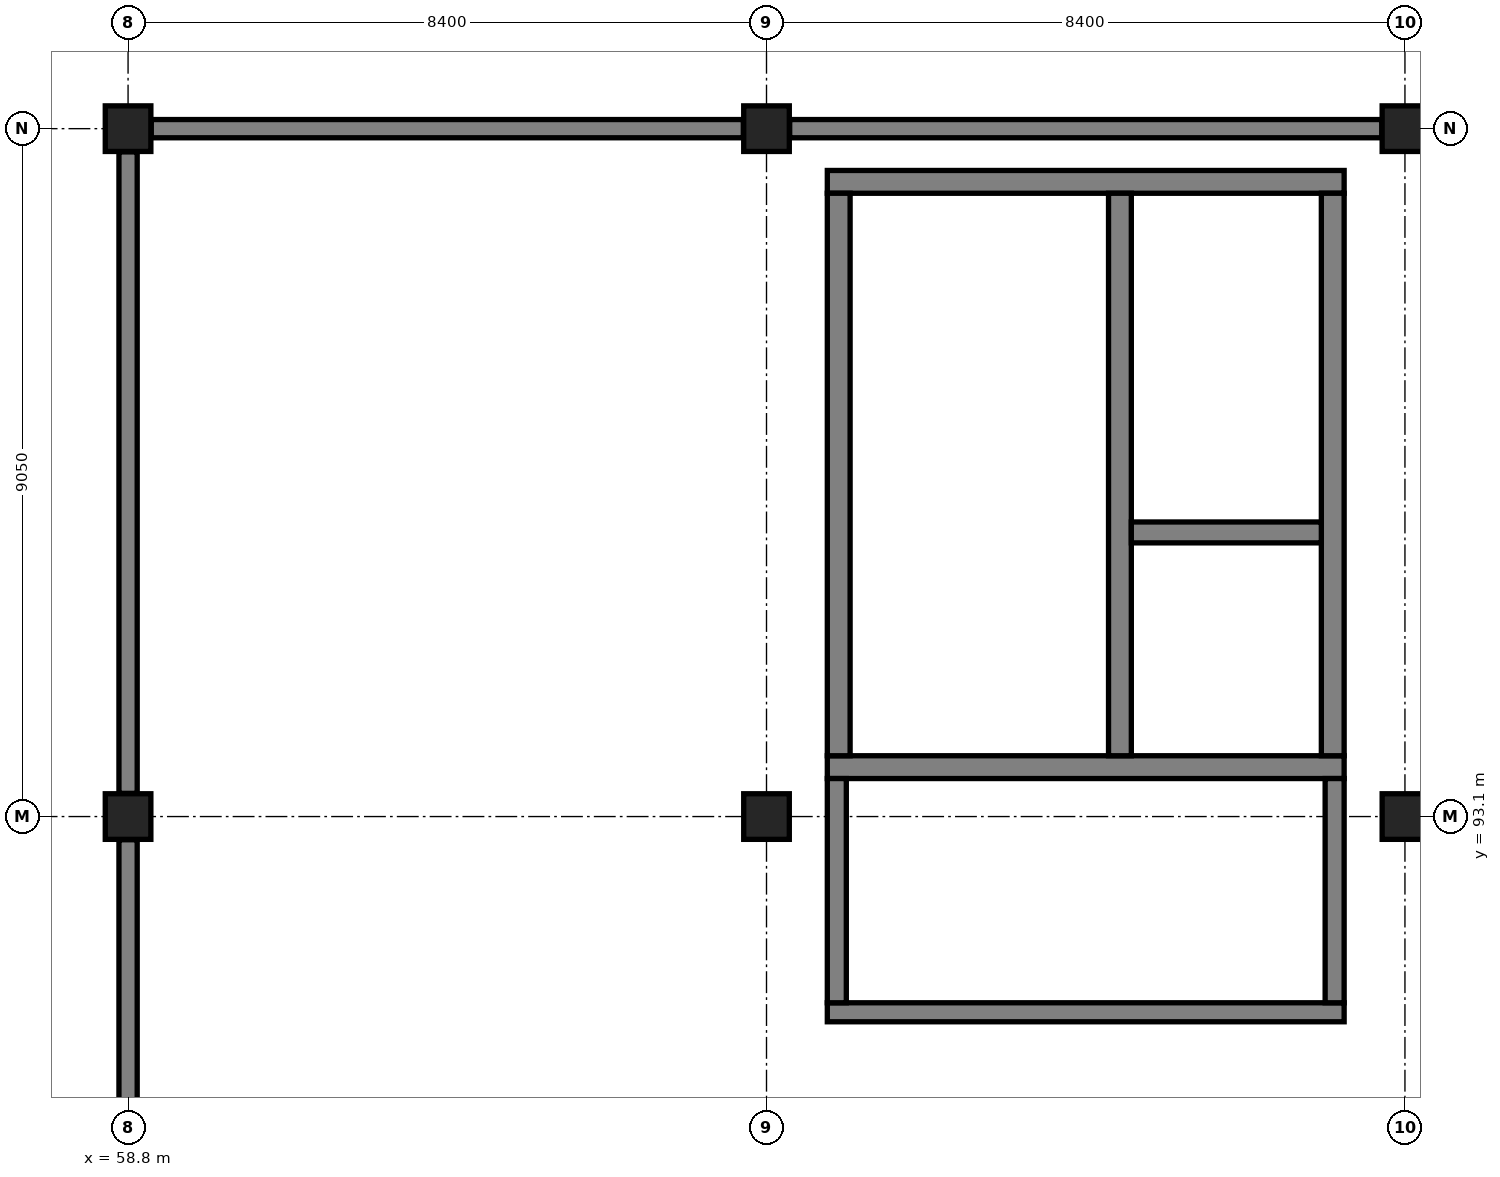
"""IFC4 building model, lengths in metres.
Left out: names, types, materials, properties, quantities, classifications, styles, units other than length and angle.
Written with IfcOpenShell. Run it as: python <this file> out.ifc"""

import sys

from ifc_helpers import new_model, si_unit, direction, frame, frame_2d, origin, origin_2d, place, context, subcontext, project, spatial, rectangle, extrude, element, fill, save


model = new_model("IFC4")
c1 = context("Model", 3, precision=1e-05, world=origin(), true_north=direction((0.0, 1.0)))
c2 = subcontext(c1, "Body", "Model", "MODEL_VIEW")
j1 = project(units=[si_unit("LENGTHUNIT", "METRE"), si_unit("PLANEANGLEUNIT", "RADIAN")], contexts=[c1])
p1 = place(None, origin())
s1 = spatial("IfcSite", under=j1, at=p1, CompositionType="ELEMENT")
p2 = place(p1, origin())
s2 = spatial("IfcBuilding", under=s1, at=p2, CompositionType="ELEMENT")
p3 = place(p2, frame((0.0, 0.0, 15.6)))
s3 = spatial("IfcBuildingStorey", under=s2, at=p3, CompositionType="ELEMENT", Elevation=15.6)
for number, where, z_axis, x_axis in (
    (1, (58.8, 93.1, 0.0), (0.0, 0.0, 1.0), (1.0, 0.0, 0.0)),
    (2, (58.8, 102.15, 0.0), (0.0, 0.0, 1.0), (1.0, 0.0, 0.0)),
    (3, (67.2, 93.1, 0.0), (0.0, 0.0, 1.0), (1.0, 0.0, 0.0)),
    (4, (67.2, 102.15, 0.0), (0.0, 0.0, 1.0), (1.0, 0.0, 0.0)),
    (5, (75.6, 93.1, 0.0), (0.0, 0.0, 1.0), (1.0, 0.0, 0.0)),
    (6, (75.6, 102.15, 0.0), (0.0, 0.0, 1.0), (1.0, 0.0, 0.0)),
):
    element("IfcColumn", number, at=place(p3, frame(where, z_axis=z_axis, x_axis=x_axis)), inside=s3, PredefinedType="COLUMN", context=c2, shape_type="SweptSolid", body=[
        extrude(rectangle(XDim=0.6, YDim=0.6, at=origin_2d()), origin(), (0.0, 0.0, 1.0), 4.5),
    ])
p4 = place(p3, frame((58.8, 101.845, 0.0), z_axis=(0.0, 0.0, 1.0), x_axis=(0.0, -1.0, 0.0)))
e7 = element("IfcWall", 7, at=p4, inside=s3, PredefinedType="STANDARD", context=c2, shape_type="SweptSolid", body=[
    extrude(rectangle(XDim=8.44, YDim=0.24, at=frame_2d((4.22, 0.0))), origin(), (0.0, 0.0, 1.0), 3.35),
])
p5 = place(p4, frame((3.07, 0.0, 0.95)))
e8 = element("IfcOpeningElement", 8, at=p5, cuts=e7, PredefinedType="OPENING", context=c2, shape_type="SweptSolid", body=[
    extrude(rectangle(XDim=2.3, YDim=2.15, at=frame_2d((1.15, 1.075))), frame((0.0, 0.13, 0.0), z_axis=(0.0, -1.0, 0.0), x_axis=(1.0, 0.0, 0.0)), (0.0, 0.0, 1.0), 0.26),
])
p6 = place(p3, frame((58.8, 92.795, 0.0), z_axis=(0.0, 0.0, 1.0), x_axis=(0.0, -1.0, 0.0)))
e9 = element("IfcWall", 9, at=p6, inside=s3, PredefinedType="STANDARD", context=c2, shape_type="SweptSolid", body=[
    extrude(rectangle(XDim=8.44, YDim=0.24, at=frame_2d((4.22, 0.0))), origin(), (0.0, 0.0, 1.0), 3.35),
])
p7 = place(p6, frame((3.345, 0.0, 0.95)))
e10 = element("IfcOpeningElement", 10, at=p7, cuts=e9, PredefinedType="OPENING", context=c2, shape_type="SweptSolid", body=[
    extrude(rectangle(XDim=1.75, YDim=1.95, at=frame_2d((0.875, 0.975))), frame((0.0, 0.13, 0.0), z_axis=(0.0, -1.0, 0.0), x_axis=(1.0, 0.0, 0.0)), (0.0, 0.0, 1.0), 0.26),
])
p8 = place(p3, frame((75.295, 102.15, 0.0), z_axis=(0.0, 0.0, 1.0), x_axis=(-1.0, 0.0, 0.0)))
e11 = element("IfcWall", 11, at=p8, inside=s3, PredefinedType="STANDARD", context=c2, shape_type="SweptSolid", body=[
    extrude(rectangle(XDim=7.79, YDim=0.24, at=frame_2d((3.895, 0.0))), origin(), (0.0, 0.0, 1.0), 3.33),
])
p9 = place(p8, frame((2.315, 0.0, 0.95)))
e12 = element("IfcOpeningElement", 12, at=p9, cuts=e11, PredefinedType="OPENING", context=c2, shape_type="SweptSolid", body=[
    extrude(rectangle(XDim=3.16, YDim=1.88, at=frame_2d((1.58, 0.94))), frame((0.0, 0.13, 0.0), z_axis=(0.0, -1.0, 0.0), x_axis=(1.0, 0.0, 0.0)), (0.0, 0.0, 1.0), 0.26),
])
p10 = place(p3, frame((66.895, 102.15, 0.0), z_axis=(0.0, 0.0, 1.0), x_axis=(-1.0, 0.0, 0.0)))
e13 = element("IfcWall", 13, at=p10, inside=s3, PredefinedType="STANDARD", context=c2, shape_type="SweptSolid", body=[
    extrude(rectangle(XDim=7.79, YDim=0.24, at=frame_2d((3.895, 0.0))), origin(), (0.0, 0.0, 1.0), 3.33),
])
p11 = place(p3, frame((68.0, 93.75, 0.0), z_axis=(0.0, 0.0, 1.0), x_axis=(1.0, 0.0, 0.0)))
e14 = element("IfcWall", 14, at=p11, inside=s3, PredefinedType="SHEAR", context=c2, shape_type="SweptSolid", body=[
    extrude(rectangle(XDim=6.8, YDim=0.3, at=frame_2d((3.4, 0.0))), origin(), (0.0, 0.0, 1.0), 4.2),
])
p12 = place(p11, frame((1.425, 0.0, 0.0)))
e15 = element("IfcOpeningElement", 15, at=p12, cuts=e14, PredefinedType="OPENING", context=c2, shape_type="SweptSolid", body=[
    extrude(rectangle(XDim=1.15, YDim=2.2, at=frame_2d((0.575, 1.1))), frame((0.0, 0.16, 0.0), z_axis=(0.0, -1.0, 0.0), x_axis=(1.0, 0.0, 0.0)), (0.0, 0.0, 1.0), 0.32),
])
p13 = place(p11, frame((4.5, 0.0, 0.0)))
e16 = element("IfcOpeningElement", 16, at=p13, cuts=e14, PredefinedType="OPENING", context=c2, shape_type="SweptSolid", body=[
    extrude(rectangle(XDim=1.5, YDim=2.3, at=frame_2d((0.75, 1.15))), frame((0.0, 0.16, 0.0), z_axis=(0.0, -1.0, 0.0), x_axis=(1.0, 0.0, 0.0)), (0.0, 0.0, 1.0), 0.32),
])
p14 = place(p3, frame((68.0, 101.45, 0.0), z_axis=(0.0, 0.0, 1.0), x_axis=(1.0, 0.0, 0.0)))
e17 = element("IfcWall", 17, at=p14, inside=s3, PredefinedType="SHEAR", context=c2, shape_type="SweptSolid", body=[
    extrude(rectangle(XDim=6.8, YDim=0.3, at=frame_2d((3.4, 0.0))), origin(), (0.0, 0.0, 1.0), 4.2),
])
for number, where, z_axis, x_axis in (
    (18, (68.15, 93.9, 0.0), (0.0, 0.0, 1.0), (0.0, 1.0, 0.0)),
    (19, (74.65, 93.9, 0.0), (0.0, 0.0, 1.0), (0.0, 1.0, 0.0)),
    (20, (71.85, 93.9, 0.0), (0.0, 0.0, 1.0), (0.0, 1.0, 0.0)),
):
    element("IfcWall", number, at=place(p3, frame(where, z_axis=z_axis, x_axis=x_axis)), inside=s3, PredefinedType="SHEAR", context=c2, shape_type="SweptSolid", body=[
        extrude(rectangle(XDim=7.4, YDim=0.3, at=frame_2d((3.7, 0.0))), origin(), (0.0, 0.0, 1.0), 4.2),
    ])
p15 = place(p3, frame((72.0, 96.838, 0.0), z_axis=(0.0, 0.0, 1.0), x_axis=(1.0, 0.0, 0.0)))
e21 = element("IfcWall", 21, at=p15, inside=s3, PredefinedType="SHEAR", context=c2, shape_type="SweptSolid", body=[
    extrude(rectangle(XDim=2.5, YDim=0.275, at=frame_2d((1.25, 0.0))), origin(), (0.0, 0.0, 1.0), 4.2),
])
p16 = place(p3, frame((68.0, 90.525, 0.0), z_axis=(0.0, 0.0, 1.0), x_axis=(1.0, 0.0, 0.0)))
e22 = element("IfcWall", 22, at=p16, inside=s3, PredefinedType="PARTITIONING", context=c2, shape_type="SweptSolid", body=[
    extrude(rectangle(XDim=6.8, YDim=0.25, at=frame_2d((3.4, 0.0))), origin(), (0.0, 0.0, 1.0), 4.2),
])
p17 = place(p16, frame((2.5, 0.0, 0.0)))
e23 = element("IfcOpeningElement", 23, at=p17, cuts=e22, PredefinedType="OPENING", context=c2, shape_type="SweptSolid", body=[
    extrude(rectangle(XDim=1.8, YDim=2.25, at=frame_2d((0.9, 1.125))), frame((0.0, 0.135, 0.0), z_axis=(0.0, -1.0, 0.0), x_axis=(1.0, 0.0, 0.0)), (0.0, 0.0, 1.0), 0.27),
])
for number, where, z_axis, x_axis in (
    (24, (68.125, 90.65, 0.0), (0.0, 0.0, 1.0), (0.0, 1.0, 0.0)),
    (25, (74.675, 90.65, 0.0), (0.0, 0.0, 1.0), (0.0, 1.0, 0.0)),
):
    element("IfcWall", number, at=place(p3, frame(where, z_axis=z_axis, x_axis=x_axis)), inside=s3, PredefinedType="PARTITIONING", context=c2, shape_type="SweptSolid", body=[
        extrude(rectangle(XDim=2.95, YDim=0.25, at=frame_2d((1.475, 0.0))), origin(), (0.0, 0.0, 1.0), 3.43),
    ])
p18 = place(p5, origin())
e26 = element("IfcWindow", 26, at=p18, inside=s3, PartitioningType="SINGLE_PANEL", PredefinedType="WINDOW", context=c2, shape_type="SweptSolid", body=[
    extrude(rectangle(XDim=2.3, YDim=2.15, at=frame_2d((1.15, 1.075))), frame((0.0, 0.03, 0.0), z_axis=(0.0, -1.0, 0.0), x_axis=(1.0, 0.0, 0.0)), (0.0, 0.0, 1.0), 0.06),
])
fill(e8, e26)
p19 = place(p7, origin())
e27 = element("IfcWindow", 27, at=p19, inside=s3, PartitioningType="SINGLE_PANEL", PredefinedType="WINDOW", context=c2, shape_type="SweptSolid", body=[
    extrude(rectangle(XDim=1.75, YDim=1.95, at=frame_2d((0.875, 0.975))), frame((0.0, 0.03, 0.0), z_axis=(0.0, -1.0, 0.0), x_axis=(1.0, 0.0, 0.0)), (0.0, 0.0, 1.0), 0.06),
])
fill(e10, e27)
p20 = place(p9, origin())
e28 = element("IfcWindow", 28, at=p20, inside=s3, PartitioningType="SINGLE_PANEL", PredefinedType="WINDOW", context=c2, shape_type="SweptSolid", body=[
    extrude(rectangle(XDim=3.16, YDim=1.88, at=frame_2d((1.58, 0.94))), frame((0.0, 0.03, 0.0), z_axis=(0.0, -1.0, 0.0), x_axis=(1.0, 0.0, 0.0)), (0.0, 0.0, 1.0), 0.06),
])
fill(e12, e28)
p21 = place(p12, origin())
e29 = element("IfcDoor", 29, at=p21, inside=s3, OperationType="SINGLE_SWING_LEFT", PredefinedType="DOOR", context=c2, shape_type="SweptSolid", body=[
    extrude(rectangle(XDim=1.15, YDim=2.2, at=frame_2d((0.575, 1.1))), frame((0.0, 0.025, 0.0), z_axis=(0.0, -1.0, 0.0), x_axis=(1.0, 0.0, 0.0)), (0.0, 0.0, 1.0), 0.05),
])
fill(e15, e29)
p22 = place(p13, origin())
e30 = element("IfcDoor", 30, at=p22, inside=s3, OperationType="DOUBLE_DOOR_SLIDING", PredefinedType="DOOR", context=c2, shape_type="SweptSolid", body=[
    extrude(rectangle(XDim=1.5, YDim=2.3, at=frame_2d((0.75, 1.15))), frame((0.0, 0.025, 0.0), z_axis=(0.0, -1.0, 0.0), x_axis=(1.0, 0.0, 0.0)), (0.0, 0.0, 1.0), 0.05),
])
fill(e16, e30)
p23 = place(p17, frame((1.8, 0.0, 0.0), z_axis=(0.0, 0.0, 1.0), x_axis=(-1.0, 0.0, 0.0)))
e31 = element("IfcDoor", 31, at=p23, inside=s3, OperationType="DOUBLE_DOOR_SINGLE_SWING", PredefinedType="DOOR", context=c2, shape_type="SweptSolid", body=[
    extrude(rectangle(XDim=1.8, YDim=2.25, at=frame_2d((0.9, 1.125))), frame((0.0, 0.025, 0.0), z_axis=(0.0, -1.0, 0.0), x_axis=(1.0, 0.0, 0.0)), (0.0, 0.0, 1.0), 0.05),
])
fill(e23, e31)
save(model, sys.argv[1])
